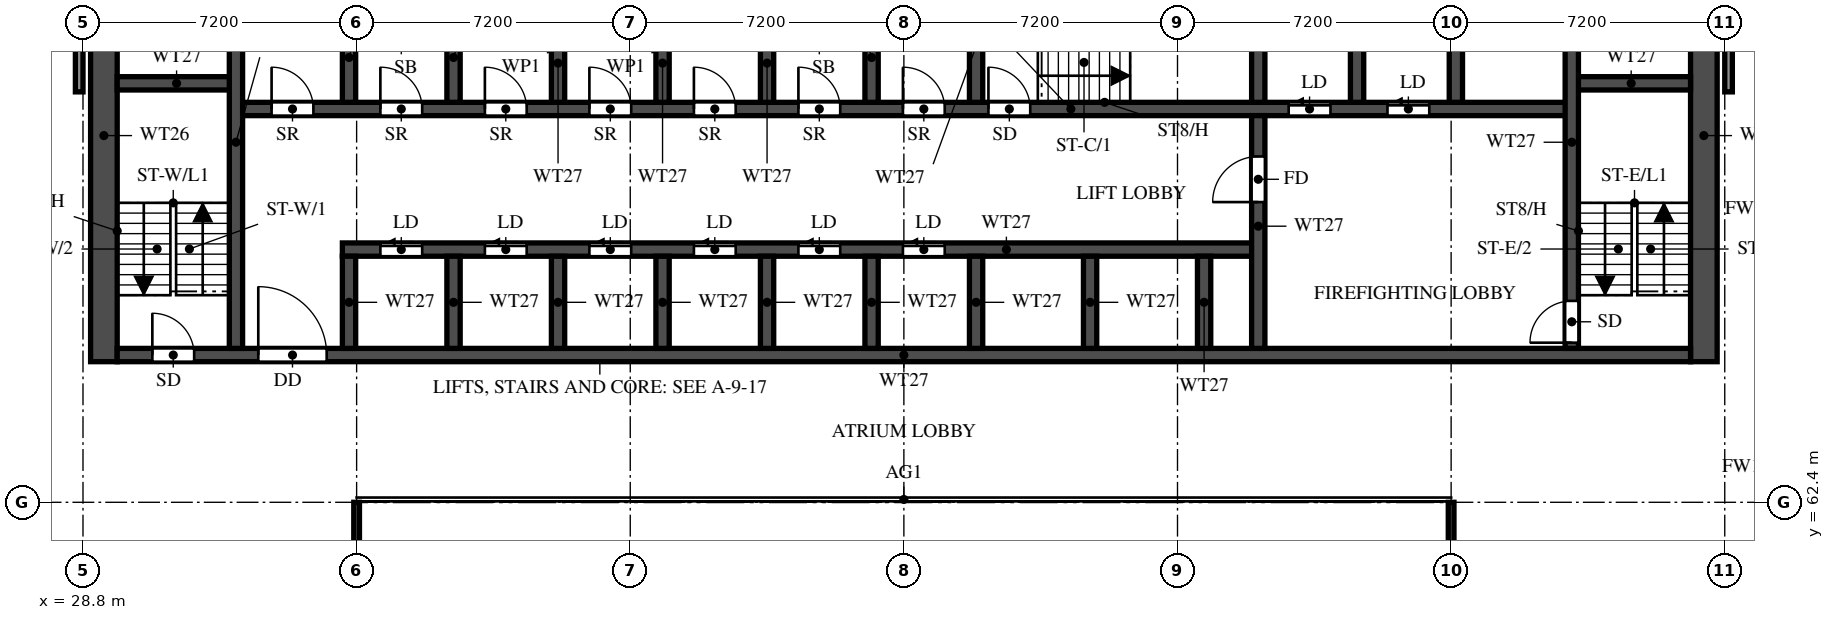
"""IFC4 building model, lengths in metres.
Left out: names, types, materials, properties, quantities, classifications, styles, units other than length and angle.
Written with IfcOpenShell. Run it as: python <this file> out.ifc"""

import sys

from ifc_helpers import new_model, si_unit, direction, frame, frame_2d, origin, place, context, subcontext, project, spatial, rectangle, extrude, element, fill, save


model = new_model("IFC4")
c1 = context("Model", 3, precision=1e-05, world=origin(), true_north=direction((0.0, 1.0)))
c2 = subcontext(c1, "Body", "Model", "MODEL_VIEW")
j1 = project(units=[si_unit("LENGTHUNIT", "METRE"), si_unit("PLANEANGLEUNIT", "RADIAN")], contexts=[c1])
p1 = place(None, origin())
s1 = spatial("IfcSite", under=j1, at=p1, CompositionType="ELEMENT")
p2 = place(p1, origin())
s2 = spatial("IfcBuilding", under=s1, at=p2, CompositionType="ELEMENT")
p3 = place(p2, frame((0.0, 0.0, 120.0)))
s3 = spatial("IfcBuildingStorey", under=s2, at=p3, CompositionType="ELEMENT", Elevation=120.0)
for number, where, z_axis, x_axis in (
    (1, (29.35, 66.1, 0.0), (0.0, 0.0, 1.0), (0.0, 1.0, 0.0)),
    (2, (71.45, 66.1, 0.0), (0.0, 0.0, 1.0), (0.0, 1.0, 0.0)),
):
    element("IfcWall", number, at=place(p3, frame(where, z_axis=z_axis, x_axis=x_axis)), inside=s3, PredefinedType="SHEAR", context=c2, shape_type="SweptSolid", body=[
        extrude(rectangle(XDim=11.9, YDim=0.7, at=frame_2d((5.95, 0.0))), origin(), (0.0, 0.0, 1.0), 3.2),
    ])
p4 = place(p3, frame((29.7, 66.275, 0.0), z_axis=(0.0, 0.0, 1.0), x_axis=(1.0, 0.0, 0.0)))
e3 = element("IfcWall", 3, at=p4, inside=s3, PredefinedType="SHEAR", context=c2, shape_type="SweptSolid", body=[
    extrude(rectangle(XDim=41.4, YDim=0.35, at=frame_2d((20.7, 0.0))), origin(), (0.0, 0.0, 1.0), 3.2),
])
p5 = place(p4, frame((0.925, 0.0, 0.0)))
e4 = element("IfcOpeningElement", 4, at=p5, cuts=e3, PredefinedType="OPENING", context=c2, shape_type="SweptSolid", body=[
    extrude(rectangle(XDim=1.1, YDim=2.1, at=frame_2d((0.55, 1.05))), frame((0.0, 0.185, 0.0), z_axis=(0.0, -1.0, 0.0), x_axis=(1.0, 0.0, 0.0)), (0.0, 0.0, 1.0), 0.37),
])
p6 = place(p4, frame((3.712, 0.0, 0.0)))
e5 = element("IfcOpeningElement", 5, at=p6, cuts=e3, PredefinedType="OPENING", context=c2, shape_type="SweptSolid", body=[
    extrude(rectangle(XDim=1.8, YDim=2.1, at=frame_2d((0.9, 1.05))), frame((0.0, 0.185, 0.0), z_axis=(0.0, -1.0, 0.0), x_axis=(1.0, 0.0, 0.0)), (0.0, 0.0, 1.0), 0.37),
])
p7 = place(p3, frame((35.625, 69.05, 0.0), z_axis=(0.0, 0.0, 1.0), x_axis=(1.0, 0.0, 0.0)))
e6 = element("IfcWall", 6, at=p7, inside=s3, PredefinedType="SHEAR", context=c2, shape_type="SweptSolid", body=[
    extrude(rectangle(XDim=24.1, YDim=0.35, at=frame_2d((12.05, 0.0))), origin(), (0.0, 0.0, 1.0), 3.2),
])
p8 = place(p7, frame((1.0, 0.0, 0.0)))
e7 = element("IfcOpeningElement", 7, at=p8, cuts=e6, PredefinedType="OPENING", context=c2, shape_type="SweptSolid", body=[
    extrude(rectangle(XDim=1.1, YDim=2.1, at=frame_2d((0.55, 1.05))), frame((0.0, 0.185, 0.0), z_axis=(0.0, -1.0, 0.0), x_axis=(1.0, 0.0, 0.0)), (0.0, 0.0, 1.0), 0.37),
])
p9 = place(p7, frame((3.75, 0.0, 0.0)))
e8 = element("IfcOpeningElement", 8, at=p9, cuts=e6, PredefinedType="OPENING", context=c2, shape_type="SweptSolid", body=[
    extrude(rectangle(XDim=1.1, YDim=2.1, at=frame_2d((0.55, 1.05))), frame((0.0, 0.185, 0.0), z_axis=(0.0, -1.0, 0.0), x_axis=(1.0, 0.0, 0.0)), (0.0, 0.0, 1.0), 0.37),
])
p10 = place(p7, frame((6.5, 0.0, 0.0)))
e9 = element("IfcOpeningElement", 9, at=p10, cuts=e6, PredefinedType="OPENING", context=c2, shape_type="SweptSolid", body=[
    extrude(rectangle(XDim=1.1, YDim=2.1, at=frame_2d((0.55, 1.05))), frame((0.0, 0.185, 0.0), z_axis=(0.0, -1.0, 0.0), x_axis=(1.0, 0.0, 0.0)), (0.0, 0.0, 1.0), 0.37),
])
p11 = place(p7, frame((9.25, 0.0, 0.0)))
e10 = element("IfcOpeningElement", 10, at=p11, cuts=e6, PredefinedType="OPENING", context=c2, shape_type="SweptSolid", body=[
    extrude(rectangle(XDim=1.1, YDim=2.1, at=frame_2d((0.55, 1.05))), frame((0.0, 0.185, 0.0), z_axis=(0.0, -1.0, 0.0), x_axis=(1.0, 0.0, 0.0)), (0.0, 0.0, 1.0), 0.37),
])
p12 = place(p7, frame((12.0, 0.0, 0.0)))
e11 = element("IfcOpeningElement", 11, at=p12, cuts=e6, PredefinedType="OPENING", context=c2, shape_type="SweptSolid", body=[
    extrude(rectangle(XDim=1.1, YDim=2.1, at=frame_2d((0.55, 1.05))), frame((0.0, 0.185, 0.0), z_axis=(0.0, -1.0, 0.0), x_axis=(1.0, 0.0, 0.0)), (0.0, 0.0, 1.0), 0.37),
])
p13 = place(p7, frame((14.75, 0.0, 0.0)))
e12 = element("IfcOpeningElement", 12, at=p13, cuts=e6, PredefinedType="OPENING", context=c2, shape_type="SweptSolid", body=[
    extrude(rectangle(XDim=1.1, YDim=2.1, at=frame_2d((0.55, 1.05))), frame((0.0, 0.185, 0.0), z_axis=(0.0, -1.0, 0.0), x_axis=(1.0, 0.0, 0.0)), (0.0, 0.0, 1.0), 0.37),
])
p14 = place(p3, frame((32.825, 72.75, 0.0), z_axis=(0.0, 0.0, 1.0), x_axis=(1.0, 0.0, 0.0)))
e13 = element("IfcWall", 13, at=p14, inside=s3, PredefinedType="SHEAR", context=c2, shape_type="SweptSolid", body=[
    extrude(rectangle(XDim=35.15, YDim=0.35, at=frame_2d((17.575, 0.0))), origin(), (0.0, 0.0, 1.0), 3.2),
])
p15 = place(p14, frame((19.8, 0.0, 0.0)))
e14 = element("IfcOpeningElement", 14, at=p15, cuts=e13, PredefinedType="OPENING", context=c2, shape_type="SweptSolid", body=[
    extrude(rectangle(XDim=1.1, YDim=2.1, at=frame_2d((0.55, 1.05))), frame((0.0, 0.185, 0.0), z_axis=(0.0, -1.0, 0.0), x_axis=(1.0, 0.0, 0.0)), (0.0, 0.0, 1.0), 0.37),
])
p16 = place(p14, frame((27.7, 0.0, 0.0)))
e15 = element("IfcOpeningElement", 15, at=p16, cuts=e13, PredefinedType="OPENING", context=c2, shape_type="SweptSolid", body=[
    extrude(rectangle(XDim=1.1, YDim=2.1, at=frame_2d((0.55, 1.05))), frame((0.0, 0.185, 0.0), z_axis=(0.0, -1.0, 0.0), x_axis=(1.0, 0.0, 0.0)), (0.0, 0.0, 1.0), 0.37),
])
p17 = place(p14, frame((30.3, 0.0, 0.0)))
e16 = element("IfcOpeningElement", 16, at=p17, cuts=e13, PredefinedType="OPENING", context=c2, shape_type="SweptSolid", body=[
    extrude(rectangle(XDim=1.1, YDim=2.1, at=frame_2d((0.55, 1.05))), frame((0.0, 0.185, 0.0), z_axis=(0.0, -1.0, 0.0), x_axis=(1.0, 0.0, 0.0)), (0.0, 0.0, 1.0), 0.37),
])
p18 = place(p14, frame((3.8, 0.0, 0.0)))
e17 = element("IfcOpeningElement", 17, at=p18, cuts=e13, PredefinedType="OPENING", context=c2, shape_type="SweptSolid", body=[
    extrude(rectangle(XDim=1.1, YDim=2.1, at=frame_2d((0.55, 1.05))), frame((0.0, 0.185, 0.0), z_axis=(0.0, -1.0, 0.0), x_axis=(1.0, 0.0, 0.0)), (0.0, 0.0, 1.0), 0.37),
])
p19 = place(p14, frame((6.55, 0.0, 0.0)))
e18 = element("IfcOpeningElement", 18, at=p19, cuts=e13, PredefinedType="OPENING", context=c2, shape_type="SweptSolid", body=[
    extrude(rectangle(XDim=1.1, YDim=2.1, at=frame_2d((0.55, 1.05))), frame((0.0, 0.185, 0.0), z_axis=(0.0, -1.0, 0.0), x_axis=(1.0, 0.0, 0.0)), (0.0, 0.0, 1.0), 0.37),
])
p20 = place(p14, frame((9.3, 0.0, 0.0)))
e19 = element("IfcOpeningElement", 19, at=p20, cuts=e13, PredefinedType="OPENING", context=c2, shape_type="SweptSolid", body=[
    extrude(rectangle(XDim=1.1, YDim=2.1, at=frame_2d((0.55, 1.05))), frame((0.0, 0.185, 0.0), z_axis=(0.0, -1.0, 0.0), x_axis=(1.0, 0.0, 0.0)), (0.0, 0.0, 1.0), 0.37),
])
p21 = place(p14, frame((12.05, 0.0, 0.0)))
e20 = element("IfcOpeningElement", 20, at=p21, cuts=e13, PredefinedType="OPENING", context=c2, shape_type="SweptSolid", body=[
    extrude(rectangle(XDim=1.1, YDim=2.1, at=frame_2d((0.55, 1.05))), frame((0.0, 0.185, 0.0), z_axis=(0.0, -1.0, 0.0), x_axis=(1.0, 0.0, 0.0)), (0.0, 0.0, 1.0), 0.37),
])
p22 = place(p14, frame((14.8, 0.0, 0.0)))
e21 = element("IfcOpeningElement", 21, at=p22, cuts=e13, PredefinedType="OPENING", context=c2, shape_type="SweptSolid", body=[
    extrude(rectangle(XDim=1.1, YDim=2.1, at=frame_2d((0.55, 1.05))), frame((0.0, 0.185, 0.0), z_axis=(0.0, -1.0, 0.0), x_axis=(1.0, 0.0, 0.0)), (0.0, 0.0, 1.0), 0.37),
])
p23 = place(p14, frame((17.55, 0.0, 0.0)))
e22 = element("IfcOpeningElement", 22, at=p23, cuts=e13, PredefinedType="OPENING", context=c2, shape_type="SweptSolid", body=[
    extrude(rectangle(XDim=1.1, YDim=2.1, at=frame_2d((0.55, 1.05))), frame((0.0, 0.185, 0.0), z_axis=(0.0, -1.0, 0.0), x_axis=(1.0, 0.0, 0.0)), (0.0, 0.0, 1.0), 0.37),
])
p24 = place(p14, frame((0.938, 0.0, 0.0)))
e23 = element("IfcOpeningElement", 23, at=p24, cuts=e13, PredefinedType="OPENING", context=c2, shape_type="SweptSolid", body=[
    extrude(rectangle(XDim=1.1, YDim=2.1, at=frame_2d((0.55, 1.05))), frame((0.0, 0.185, 0.0), z_axis=(0.0, -1.0, 0.0), x_axis=(1.0, 0.0, 0.0)), (0.0, 0.0, 1.0), 0.37),
])
for number, where, z_axis, x_axis in (
    (24, (29.7, 73.425, 0.0), (0.0, 0.0, 1.0), (1.0, 0.0, 0.0)),
    (25, (67.975, 73.425, 0.0), (0.0, 0.0, 1.0), (1.0, 0.0, 0.0)),
):
    element("IfcWall", number, at=place(p3, frame(where, z_axis=z_axis, x_axis=x_axis)), inside=s3, PredefinedType="SHEAR", context=c2, shape_type="SweptSolid", body=[
        extrude(rectangle(XDim=3.125, YDim=0.35, at=frame_2d((1.562, 0.0))), origin(), (0.0, 0.0, 1.0), 3.2),
    ])
p25 = place(p3, frame((32.825, 66.45, 0.0), z_axis=(0.0, 0.0, 1.0), x_axis=(0.0, 1.0, 0.0)))
e26 = element("IfcWall", 26, at=p25, inside=s3, PredefinedType="SHEAR", context=c2, shape_type="SweptSolid", body=[
    extrude(rectangle(XDim=10.85, YDim=0.35, at=frame_2d((5.425, 0.0))), origin(), (0.0, 0.0, 1.0), 3.2),
])
p26 = place(p3, frame((67.975, 66.45, 0.0), z_axis=(0.0, 0.0, 1.0), x_axis=(0.0, 1.0, 0.0)))
e27 = element("IfcWall", 27, at=p26, inside=s3, PredefinedType="SHEAR", context=c2, shape_type="SweptSolid", body=[
    extrude(rectangle(XDim=10.85, YDim=0.35, at=frame_2d((5.425, 0.0))), origin(), (0.0, 0.0, 1.0), 3.2),
])
p27 = place(p26, frame((0.15, 0.0, 0.0)))
e28 = element("IfcOpeningElement", 28, at=p27, cuts=e27, PredefinedType="OPENING", context=c2, shape_type="SweptSolid", body=[
    extrude(rectangle(XDim=1.1, YDim=2.1, at=frame_2d((0.55, 1.05))), frame((0.0, 0.185, 0.0), z_axis=(0.0, -1.0, 0.0), x_axis=(1.0, 0.0, 0.0)), (0.0, 0.0, 1.0), 0.37),
])
p28 = place(p3, frame((59.725, 66.45, 0.0), z_axis=(0.0, 0.0, 1.0), x_axis=(0.0, 1.0, 0.0)))
e29 = element("IfcWall", 29, at=p28, inside=s3, PredefinedType="SHEAR", context=c2, shape_type="SweptSolid", body=[
    extrude(rectangle(XDim=6.125, YDim=0.35, at=frame_2d((3.062, 0.0))), origin(), (0.0, 0.0, 1.0), 3.2),
])
p29 = place(p28, frame((3.85, 0.0, 0.0)))
e30 = element("IfcOpeningElement", 30, at=p29, cuts=e29, PredefinedType="OPENING", context=c2, shape_type="SweptSolid", body=[
    extrude(rectangle(XDim=1.2, YDim=2.1, at=frame_2d((0.6, 1.05))), frame((0.0, 0.185, 0.0), z_axis=(0.0, -1.0, 0.0), x_axis=(1.0, 0.0, 0.0)), (0.0, 0.0, 1.0), 0.37),
])
p30 = place(p3, frame((59.725, 72.925, 0.0), z_axis=(0.0, 0.0, 1.0), x_axis=(0.0, 1.0, 0.0)))
e31 = element("IfcWall", 31, at=p30, inside=s3, PredefinedType="SHEAR", context=c2, shape_type="SweptSolid", body=[
    extrude(rectangle(XDim=2.95, YDim=0.35, at=frame_2d((1.475, 0.0))), origin(), (0.0, 0.0, 1.0), 3.2),
])
for number, where, z_axis, x_axis in (
    (32, (35.8, 66.45, 0.0), (0.0, 0.0, 1.0), (0.0, 1.0, 0.0)),
    (33, (38.55, 66.45, 0.0), (0.0, 0.0, 1.0), (0.0, 1.0, 0.0)),
    (34, (41.3, 66.45, 0.0), (0.0, 0.0, 1.0), (0.0, 1.0, 0.0)),
    (35, (44.05, 66.45, 0.0), (0.0, 0.0, 1.0), (0.0, 1.0, 0.0)),
    (36, (46.8, 66.45, 0.0), (0.0, 0.0, 1.0), (0.0, 1.0, 0.0)),
    (37, (49.55, 66.45, 0.0), (0.0, 0.0, 1.0), (0.0, 1.0, 0.0)),
    (38, (52.3, 66.45, 0.0), (0.0, 0.0, 1.0), (0.0, 1.0, 0.0)),
    (39, (55.3, 66.45, 0.0), (0.0, 0.0, 1.0), (0.0, 1.0, 0.0)),
    (40, (58.3, 66.45, 0.0), (0.0, 0.0, 1.0), (0.0, 1.0, 0.0)),
):
    element("IfcWall", number, at=place(p3, frame(where, z_axis=z_axis, x_axis=x_axis)), inside=s3, PredefinedType="SHEAR", context=c2, shape_type="SweptSolid", body=[
        extrude(rectangle(XDim=2.425, YDim=0.35, at=frame_2d((1.212, 0.0))), origin(), (0.0, 0.0, 1.0), 3.2),
    ])
for number, where, z_axis, x_axis in (
    (41, (35.8, 72.925, 0.0), (0.0, 0.0, 1.0), (0.0, 1.0, 0.0)),
    (42, (38.55, 72.925, 0.0), (0.0, 0.0, 1.0), (0.0, 1.0, 0.0)),
    (43, (41.3, 72.925, 0.0), (0.0, 0.0, 1.0), (0.0, 1.0, 0.0)),
    (44, (44.05, 72.925, 0.0), (0.0, 0.0, 1.0), (0.0, 1.0, 0.0)),
    (45, (46.8, 72.925, 0.0), (0.0, 0.0, 1.0), (0.0, 1.0, 0.0)),
    (46, (49.55, 72.925, 0.0), (0.0, 0.0, 1.0), (0.0, 1.0, 0.0)),
    (47, (52.3, 72.925, 0.0), (0.0, 0.0, 1.0), (0.0, 1.0, 0.0)),
    (48, (62.325, 72.925, 0.0), (0.0, 0.0, 1.0), (0.0, 1.0, 0.0)),
    (49, (64.925, 72.925, 0.0), (0.0, 0.0, 1.0), (0.0, 1.0, 0.0)),
):
    element("IfcWall", number, at=place(p3, frame(where, z_axis=z_axis, x_axis=x_axis)), inside=s3, PredefinedType="SHEAR", context=c2, shape_type="SweptSolid", body=[
        extrude(rectangle(XDim=2.95, YDim=0.35, at=frame_2d((1.475, 0.0))), origin(), (0.0, 0.0, 1.0), 3.2),
    ])
for number, where, z_axis, x_axis in (
    (50, (28.7, 73.2, 0.0), (0.0, 0.0, 1.0), (0.0, 1.0, 0.0)),
    (51, (72.1, 73.2, 0.0), (0.0, 0.0, 1.0), (0.0, 1.0, 0.0)),
):
    element("IfcWall", number, at=place(p3, frame(where, z_axis=z_axis, x_axis=x_axis)), inside=s3, PredefinedType="SOLIDWALL", context=c2, shape_type="SweptSolid", body=[
        extrude(rectangle(XDim=4.8, YDim=0.2, at=frame_2d((2.4, 0.0))), origin(), (0.0, 0.0, 1.0), 3.2),
    ])
for number, where, z_axis, x_axis in (
    (52, (36.0, 48.0, 0.0), (0.0, 0.0, 1.0), (0.0, 1.0, 0.0)),
    (53, (64.8, 48.0, 0.0), (0.0, 0.0, 1.0), (0.0, 1.0, 0.0)),
):
    element("IfcWall", number, at=place(p3, frame(where, z_axis=z_axis, x_axis=x_axis)), inside=s3, PredefinedType="SOLIDWALL", context=c2, shape_type="SweptSolid", body=[
        extrude(rectangle(XDim=14.4, YDim=0.15, at=frame_2d((7.2, 0.0))), origin(), (0.0, 0.0, 1.0), 2.3),
    ])
p31 = place(p5, origin())
e54 = element("IfcDoor", 54, at=p31, inside=s3, OperationType="SINGLE_SWING_LEFT", PredefinedType="DOOR", context=c2, shape_type="SweptSolid", body=[
    extrude(rectangle(XDim=1.1, YDim=2.1, at=frame_2d((0.55, 1.05))), frame((0.0, 0.025, 0.0), z_axis=(0.0, -1.0, 0.0), x_axis=(1.0, 0.0, 0.0)), (0.0, 0.0, 1.0), 0.05),
])
fill(e4, e54)
p32 = place(p15, origin())
e55 = element("IfcDoor", 55, at=p32, inside=s3, OperationType="SINGLE_SWING_LEFT", PredefinedType="DOOR", context=c2, shape_type="SweptSolid", body=[
    extrude(rectangle(XDim=1.1, YDim=2.1, at=frame_2d((0.55, 1.05))), frame((0.0, 0.025, 0.0), z_axis=(0.0, -1.0, 0.0), x_axis=(1.0, 0.0, 0.0)), (0.0, 0.0, 1.0), 0.05),
])
fill(e14, e55)
p33 = place(p27, origin())
e56 = element("IfcDoor", 56, at=p33, inside=s3, OperationType="SINGLE_SWING_LEFT", PredefinedType="DOOR", context=c2, shape_type="SweptSolid", body=[
    extrude(rectangle(XDim=1.1, YDim=2.1, at=frame_2d((0.55, 1.05))), frame((0.0, 0.025, 0.0), z_axis=(0.0, -1.0, 0.0), x_axis=(1.0, 0.0, 0.0)), (0.0, 0.0, 1.0), 0.05),
])
fill(e28, e56)
p34 = place(p6, origin())
e57 = element("IfcDoor", 57, at=p34, inside=s3, OperationType="DOUBLE_DOOR_SINGLE_SWING", PredefinedType="DOOR", context=c2, shape_type="SweptSolid", body=[
    extrude(rectangle(XDim=1.8, YDim=2.1, at=frame_2d((0.9, 1.05))), frame((0.0, 0.025, 0.0), z_axis=(0.0, -1.0, 0.0), x_axis=(1.0, 0.0, 0.0)), (0.0, 0.0, 1.0), 0.05),
])
fill(e5, e57)
p35 = place(p29, origin())
e58 = element("IfcDoor", 58, at=p35, inside=s3, OperationType="SINGLE_SWING_LEFT", PredefinedType="DOOR", context=c2, shape_type="SweptSolid", body=[
    extrude(rectangle(XDim=1.2, YDim=2.1, at=frame_2d((0.6, 1.05))), frame((0.0, 0.025, 0.0), z_axis=(0.0, -1.0, 0.0), x_axis=(1.0, 0.0, 0.0)), (0.0, 0.0, 1.0), 0.05),
])
fill(e30, e58)
p36 = place(p16, origin())
e59 = element("IfcDoor", 59, at=p36, inside=s3, OperationType="SLIDING_TO_LEFT", PredefinedType="DOOR", context=c2, shape_type="SweptSolid", body=[
    extrude(rectangle(XDim=1.1, YDim=2.1, at=frame_2d((0.55, 1.05))), frame((0.0, 0.025, 0.0), z_axis=(0.0, -1.0, 0.0), x_axis=(1.0, 0.0, 0.0)), (0.0, 0.0, 1.0), 0.05),
])
fill(e15, e59)
p37 = place(p17, origin())
e60 = element("IfcDoor", 60, at=p37, inside=s3, OperationType="SLIDING_TO_LEFT", PredefinedType="DOOR", context=c2, shape_type="SweptSolid", body=[
    extrude(rectangle(XDim=1.1, YDim=2.1, at=frame_2d((0.55, 1.05))), frame((0.0, 0.025, 0.0), z_axis=(0.0, -1.0, 0.0), x_axis=(1.0, 0.0, 0.0)), (0.0, 0.0, 1.0), 0.05),
])
fill(e16, e60)
p38 = place(p8, origin())
e61 = element("IfcDoor", 61, at=p38, inside=s3, OperationType="SLIDING_TO_LEFT", PredefinedType="DOOR", context=c2, shape_type="SweptSolid", body=[
    extrude(rectangle(XDim=1.1, YDim=2.1, at=frame_2d((0.55, 1.05))), frame((0.0, 0.025, 0.0), z_axis=(0.0, -1.0, 0.0), x_axis=(1.0, 0.0, 0.0)), (0.0, 0.0, 1.0), 0.05),
])
fill(e7, e61)
p39 = place(p9, origin())
e62 = element("IfcDoor", 62, at=p39, inside=s3, OperationType="SLIDING_TO_LEFT", PredefinedType="DOOR", context=c2, shape_type="SweptSolid", body=[
    extrude(rectangle(XDim=1.1, YDim=2.1, at=frame_2d((0.55, 1.05))), frame((0.0, 0.025, 0.0), z_axis=(0.0, -1.0, 0.0), x_axis=(1.0, 0.0, 0.0)), (0.0, 0.0, 1.0), 0.05),
])
fill(e8, e62)
p40 = place(p10, origin())
e63 = element("IfcDoor", 63, at=p40, inside=s3, OperationType="SLIDING_TO_LEFT", PredefinedType="DOOR", context=c2, shape_type="SweptSolid", body=[
    extrude(rectangle(XDim=1.1, YDim=2.1, at=frame_2d((0.55, 1.05))), frame((0.0, 0.025, 0.0), z_axis=(0.0, -1.0, 0.0), x_axis=(1.0, 0.0, 0.0)), (0.0, 0.0, 1.0), 0.05),
])
fill(e9, e63)
p41 = place(p11, origin())
e64 = element("IfcDoor", 64, at=p41, inside=s3, OperationType="SLIDING_TO_LEFT", PredefinedType="DOOR", context=c2, shape_type="SweptSolid", body=[
    extrude(rectangle(XDim=1.1, YDim=2.1, at=frame_2d((0.55, 1.05))), frame((0.0, 0.025, 0.0), z_axis=(0.0, -1.0, 0.0), x_axis=(1.0, 0.0, 0.0)), (0.0, 0.0, 1.0), 0.05),
])
fill(e10, e64)
p42 = place(p12, origin())
e65 = element("IfcDoor", 65, at=p42, inside=s3, OperationType="SLIDING_TO_LEFT", PredefinedType="DOOR", context=c2, shape_type="SweptSolid", body=[
    extrude(rectangle(XDim=1.1, YDim=2.1, at=frame_2d((0.55, 1.05))), frame((0.0, 0.025, 0.0), z_axis=(0.0, -1.0, 0.0), x_axis=(1.0, 0.0, 0.0)), (0.0, 0.0, 1.0), 0.05),
])
fill(e11, e65)
p43 = place(p13, origin())
e66 = element("IfcDoor", 66, at=p43, inside=s3, OperationType="SLIDING_TO_LEFT", PredefinedType="DOOR", context=c2, shape_type="SweptSolid", body=[
    extrude(rectangle(XDim=1.1, YDim=2.1, at=frame_2d((0.55, 1.05))), frame((0.0, 0.025, 0.0), z_axis=(0.0, -1.0, 0.0), x_axis=(1.0, 0.0, 0.0)), (0.0, 0.0, 1.0), 0.05),
])
fill(e12, e66)
p44 = place(p18, origin())
e67 = element("IfcDoor", 67, at=p44, inside=s3, OperationType="SINGLE_SWING_LEFT", PredefinedType="DOOR", context=c2, shape_type="SweptSolid", body=[
    extrude(rectangle(XDim=1.1, YDim=2.1, at=frame_2d((0.55, 1.05))), frame((0.0, 0.025, 0.0), z_axis=(0.0, -1.0, 0.0), x_axis=(1.0, 0.0, 0.0)), (0.0, 0.0, 1.0), 0.05),
])
fill(e17, e67)
p45 = place(p19, origin())
e68 = element("IfcDoor", 68, at=p45, inside=s3, OperationType="SINGLE_SWING_RIGHT", PredefinedType="DOOR", context=c2, shape_type="SweptSolid", body=[
    extrude(rectangle(XDim=1.1, YDim=2.1, at=frame_2d((0.55, 1.05))), frame((0.0, 0.025, 0.0), z_axis=(0.0, -1.0, 0.0), x_axis=(1.0, 0.0, 0.0)), (0.0, 0.0, 1.0), 0.05),
])
fill(e18, e68)
p46 = place(p20, origin())
e69 = element("IfcDoor", 69, at=p46, inside=s3, OperationType="SINGLE_SWING_LEFT", PredefinedType="DOOR", context=c2, shape_type="SweptSolid", body=[
    extrude(rectangle(XDim=1.1, YDim=2.1, at=frame_2d((0.55, 1.05))), frame((0.0, 0.025, 0.0), z_axis=(0.0, -1.0, 0.0), x_axis=(1.0, 0.0, 0.0)), (0.0, 0.0, 1.0), 0.05),
])
fill(e19, e69)
p47 = place(p21, origin())
e70 = element("IfcDoor", 70, at=p47, inside=s3, OperationType="SINGLE_SWING_RIGHT", PredefinedType="DOOR", context=c2, shape_type="SweptSolid", body=[
    extrude(rectangle(XDim=1.1, YDim=2.1, at=frame_2d((0.55, 1.05))), frame((0.0, 0.025, 0.0), z_axis=(0.0, -1.0, 0.0), x_axis=(1.0, 0.0, 0.0)), (0.0, 0.0, 1.0), 0.05),
])
fill(e20, e70)
p48 = place(p22, origin())
e71 = element("IfcDoor", 71, at=p48, inside=s3, OperationType="SINGLE_SWING_LEFT", PredefinedType="DOOR", context=c2, shape_type="SweptSolid", body=[
    extrude(rectangle(XDim=1.1, YDim=2.1, at=frame_2d((0.55, 1.05))), frame((0.0, 0.025, 0.0), z_axis=(0.0, -1.0, 0.0), x_axis=(1.0, 0.0, 0.0)), (0.0, 0.0, 1.0), 0.05),
])
fill(e21, e71)
p49 = place(p23, origin())
e72 = element("IfcDoor", 72, at=p49, inside=s3, OperationType="SINGLE_SWING_RIGHT", PredefinedType="DOOR", context=c2, shape_type="SweptSolid", body=[
    extrude(rectangle(XDim=1.1, YDim=2.1, at=frame_2d((0.55, 1.05))), frame((0.0, 0.025, 0.0), z_axis=(0.0, -1.0, 0.0), x_axis=(1.0, 0.0, 0.0)), (0.0, 0.0, 1.0), 0.05),
])
fill(e22, e72)
p50 = place(p24, origin())
e73 = element("IfcDoor", 73, at=p50, inside=s3, OperationType="SINGLE_SWING_LEFT", PredefinedType="DOOR", context=c2, shape_type="SweptSolid", body=[
    extrude(rectangle(XDim=1.1, YDim=2.1, at=frame_2d((0.55, 1.05))), frame((0.0, 0.025, 0.0), z_axis=(0.0, -1.0, 0.0), x_axis=(1.0, 0.0, 0.0)), (0.0, 0.0, 1.0), 0.05),
])
fill(e23, e73)
save(model, sys.argv[1])
